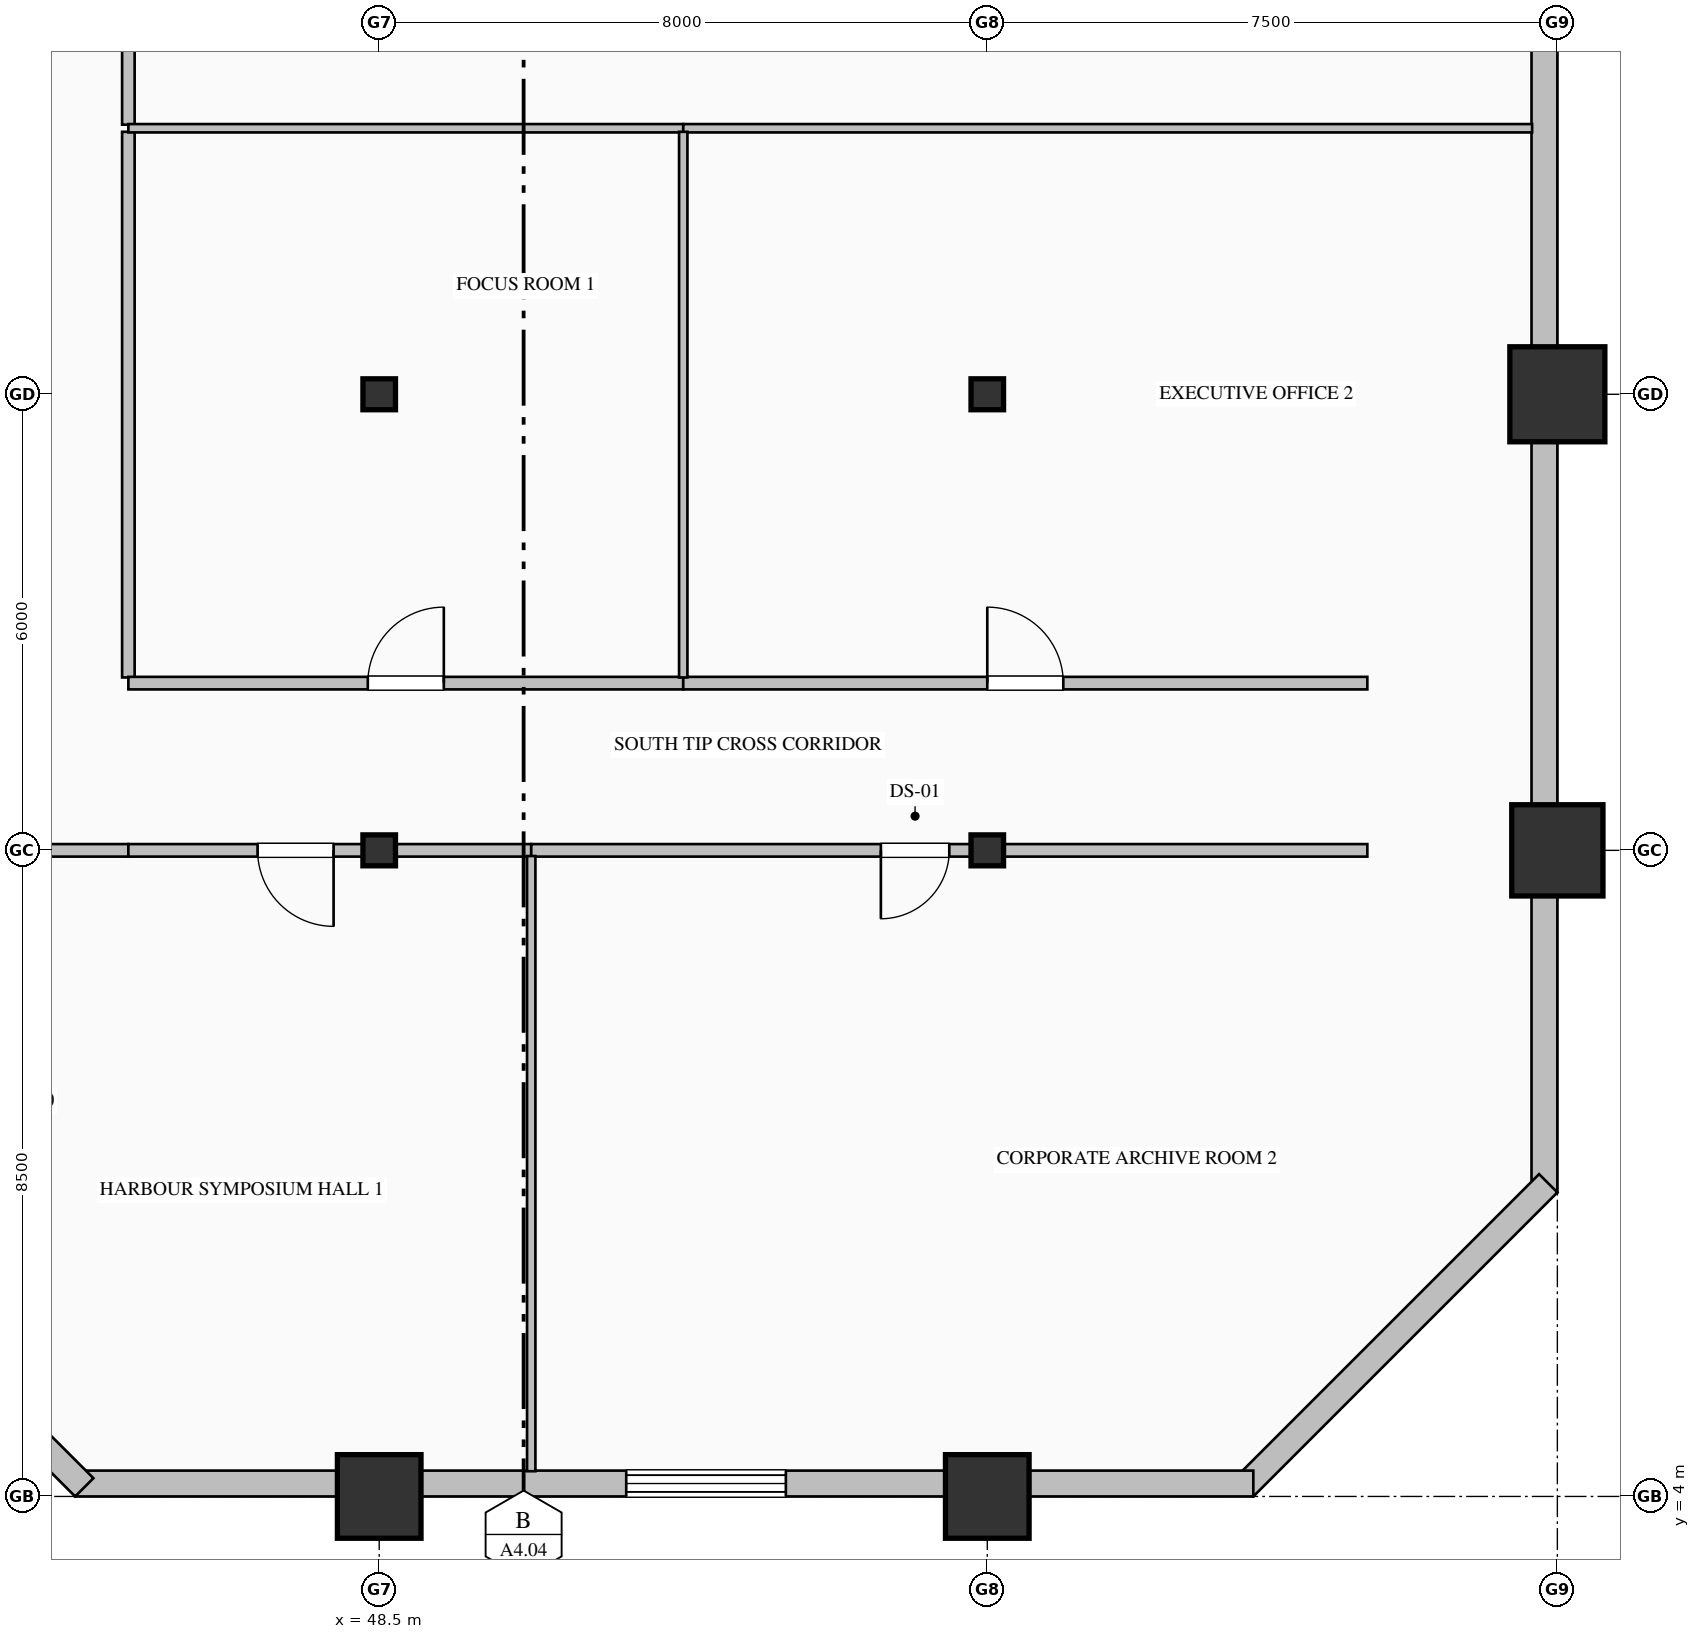
"""IFC4 building model, lengths in metres.
Left out: names, types, materials, properties, quantities, classifications, styles, units other than length and angle.
Written with IfcOpenShell. Run it as: python <this file> out.ifc"""

import sys

from ifc_helpers import new_model, si_unit, direction, frame, frame_2d, origin, origin_2d, place, context, subcontext, project, spatial, rectangle, hollow_rectangle, hollow_circle, i_section, extrude, element, fill, save


model = new_model("IFC4")
c1 = context("Model", 3, precision=1e-05, world=origin(), true_north=direction((0.0, 1.0)))
c2 = subcontext(c1, "Body", "Model", "MODEL_VIEW")
j1 = project(units=[si_unit("LENGTHUNIT", "METRE"), si_unit("PLANEANGLEUNIT", "RADIAN")], contexts=[c1])
p1 = place(None, origin())
s1 = spatial("IfcSite", under=j1, at=p1, CompositionType="ELEMENT")
p2 = place(p1, origin())
s2 = spatial("IfcBuilding", under=s1, at=p2, CompositionType="ELEMENT")
p3 = place(p2, frame((0.0, 0.0, 56.2)))
s3 = spatial("IfcBuildingStorey", under=s2, at=p3, CompositionType="ELEMENT", Elevation=56.2)
p4 = place(p3, frame((48.5, 4.0, 0.0), z_axis=(0.0, 0.0, 1.0), x_axis=(1.0, 0.0, 0.0)))
e1 = element("IfcColumn", 1, at=p4, inside=s3, PredefinedType="COLUMN", context=c2, shape_type="SweptSolid", body=[
    extrude(hollow_rectangle(XDim=1.1, YDim=1.1, WallThickness=0.04, at=origin_2d()), origin(), (0.0, 0.0, 1.0), 4.0),
])
for number, where, z_axis, x_axis in (
    (2, (48.5, 12.5, 0.0), (0.0, 0.0, 1.0), (1.0, 0.0, 0.0)),
    (3, (48.5, 18.5, 0.0), (0.0, 0.0, 1.0), (1.0, 0.0, 0.0)),
):
    element("IfcColumn", number, at=place(p3, frame(where, z_axis=z_axis, x_axis=x_axis)), inside=s3, PredefinedType="COLUMN", context=c2, shape_type="SweptSolid", body=[
        extrude(i_section(OverallWidth=0.407, OverallDepth=0.428, WebThickness=0.02, FlangeThickness=0.035, FilletRadius=0.022, at=origin_2d()), origin(), (0.0, 0.0, 1.0), 4.0),
    ])
p5 = place(p3, frame((56.5, 4.0, 0.0), z_axis=(0.0, 0.0, 1.0), x_axis=(1.0, 0.0, 0.0)))
e4 = element("IfcColumn", 4, at=p5, inside=s3, PredefinedType="COLUMN", context=c2, shape_type="SweptSolid", body=[
    extrude(hollow_rectangle(XDim=1.1, YDim=1.1, WallThickness=0.04, at=origin_2d()), origin(), (0.0, 0.0, 1.0), 4.0),
])
for number, where, z_axis, x_axis in (
    (5, (56.5, 12.5, 0.0), (0.0, 0.0, 1.0), (1.0, 0.0, 0.0)),
    (6, (56.5, 18.5, 0.0), (0.0, 0.0, 1.0), (1.0, 0.0, 0.0)),
):
    element("IfcColumn", number, at=place(p3, frame(where, z_axis=z_axis, x_axis=x_axis)), inside=s3, PredefinedType="COLUMN", context=c2, shape_type="SweptSolid", body=[
        extrude(i_section(OverallWidth=0.407, OverallDepth=0.428, WebThickness=0.02, FlangeThickness=0.035, FilletRadius=0.022, at=origin_2d()), origin(), (0.0, 0.0, 1.0), 4.0),
    ])
p6 = place(p3, frame((64.0, 12.5, 0.0), z_axis=(0.0, 0.0, 1.0), x_axis=(1.0, 0.0, 0.0)))
e7 = element("IfcColumn", 7, at=p6, inside=s3, PredefinedType="COLUMN", context=c2, shape_type="SweptSolid", body=[
    extrude(hollow_circle(Radius=0.6, WallThickness=0.04, at=origin_2d()), origin(), (0.0, 0.0, 1.0), 4.0),
])
p7 = place(p3, frame((64.0, 18.5, 0.0), z_axis=(0.0, 0.0, 1.0), x_axis=(1.0, 0.0, 0.0)))
e8 = element("IfcColumn", 8, at=p7, inside=s3, PredefinedType="COLUMN", context=c2, shape_type="SweptSolid", body=[
    extrude(hollow_rectangle(XDim=1.25, YDim=1.25, WallThickness=0.045, at=origin_2d()), origin(), (0.0, 0.0, 1.0), 4.0),
])
p8 = place(p3, frame((63.83, 36.05, 0.0), z_axis=(0.0, 0.0, 1.0), x_axis=(0.0, -1.0, 0.0)))
e9 = element("IfcWall", 9, at=p8, inside=s3, PredefinedType="SOLIDWALL", context=c2, shape_type="SweptSolid", body=[
    extrude(rectangle(XDim=28.05, YDim=0.34, at=frame_2d((14.025, 0.0))), origin(), (0.0, 0.0, 1.0), 3.25),
])
p9 = place(p8, frame((2.55, 0.0, 0.85)))
e10 = element("IfcOpeningElement", 10, at=p9, cuts=e9, PredefinedType="OPENING", context=c2, shape_type="SweptSolid", body=[
    extrude(rectangle(XDim=2.1, YDim=2.05, at=frame_2d((1.05, 1.025))), frame((0.0, 0.18, 0.0), z_axis=(0.0, -1.0, 0.0), x_axis=(1.0, 0.0, 0.0)), (0.0, 0.0, 1.0), 0.36),
])
p10 = place(p8, frame((9.9, 0.0, 0.85)))
e11 = element("IfcOpeningElement", 11, at=p10, cuts=e9, PredefinedType="OPENING", context=c2, shape_type="SweptSolid", body=[
    extrude(rectangle(XDim=1.8, YDim=2.05, at=frame_2d((0.9, 1.025))), frame((0.0, 0.18, 0.0), z_axis=(0.0, -1.0, 0.0), x_axis=(1.0, 0.0, 0.0)), (0.0, 0.0, 1.0), 0.36),
])
p11 = place(p3, frame((63.88, 8.12, 0.0), z_axis=(0.0, 0.0, 1.0), x_axis=(-0.707106781187, -0.707106781187, 0.0)))
e12 = element("IfcWall", 12, at=p11, inside=s3, PredefinedType="SOLIDWALL", context=c2, shape_type="SweptSolid", body=[
    extrude(rectangle(XDim=5.657, YDim=0.34, at=frame_2d((2.828, 0.0))), origin(), (0.0, 0.0, 1.0), 3.75),
])
p12 = place(p3, frame((60.0, 4.17, 0.0), z_axis=(0.0, 0.0, 1.0), x_axis=(-1.0, 0.0, 0.0)))
e13 = element("IfcWall", 13, at=p12, inside=s3, PredefinedType="SOLIDWALL", context=c2, shape_type="SweptSolid", body=[
    extrude(rectangle(XDim=15.5, YDim=0.34, at=frame_2d((7.75, 0.0))), origin(), (0.0, 0.0, 1.0), 3.25),
])
p13 = place(p12, frame((6.15, 0.0, 0.85)))
e14 = element("IfcOpeningElement", 14, at=p13, cuts=e13, PredefinedType="OPENING", context=c2, shape_type="SweptSolid", body=[
    extrude(rectangle(XDim=2.1, YDim=2.05, at=frame_2d((1.05, 1.025))), frame((0.0, 0.18, 0.0), z_axis=(0.0, -1.0, 0.0), x_axis=(1.0, 0.0, 0.0)), (0.0, 0.0, 1.0), 0.36),
])
p14 = place(p3, frame((44.62, 4.12, 0.0), z_axis=(0.0, 0.0, 1.0), x_axis=(-0.707106781187, 0.707106781187, 0.0)))
e15 = element("IfcWall", 15, at=p14, inside=s3, PredefinedType="SOLIDWALL", context=c2, shape_type="SweptSolid", body=[
    extrude(rectangle(XDim=5.657, YDim=0.34, at=frame_2d((2.828, 0.0))), origin(), (0.0, 0.0, 1.0), 3.75),
])
p15 = place(p3, frame((45.2, 31.525, 0.0), z_axis=(0.0, 0.0, 1.0), x_axis=(0.0, -1.0, 0.0)))
e16 = element("IfcWall", 16, at=p15, inside=s3, PredefinedType="PARTITIONING", context=c2, shape_type="SweptSolid", body=[
    extrude(rectangle(XDim=9.478, YDim=0.165, at=frame_2d((4.739, 0.0))), origin(), (0.0, 0.0, 1.0), 3.75),
])
p16 = place(p3, frame((45.2, 21.953, 0.0), z_axis=(0.0, 0.0, 1.0), x_axis=(0.0, -1.0, 0.0)))
e17 = element("IfcWall", 17, at=p16, inside=s3, PredefinedType="PARTITIONING", context=c2, shape_type="SweptSolid", body=[
    extrude(rectangle(XDim=7.178, YDim=0.165, at=frame_2d((3.589, 0.0))), origin(), (0.0, 0.0, 1.0), 3.75),
])
p17 = place(p3, frame((45.2, 12.5, 0.0), z_axis=(0.0, 0.0, 1.0), x_axis=(-1.0, 0.0, 0.0)))
e18 = element("IfcWall", 18, at=p17, inside=s3, PredefinedType="PARTITIONING", context=c2, shape_type="SweptSolid", body=[
    extrude(rectangle(XDim=2.2, YDim=0.165, at=frame_2d((1.1, 0.0))), origin(), (0.0, 0.0, 1.0), 3.042),
])
p18 = place(p3, frame((45.2, 14.7, 0.0), z_axis=(0.0, 0.0, 1.0), x_axis=(1.0, 0.0, 0.0)))
e19 = element("IfcWall", 19, at=p18, inside=s3, PredefinedType="PARTITIONING", context=c2, shape_type="SweptSolid", body=[
    extrude(rectangle(XDim=7.3, YDim=0.165, at=frame_2d((3.65, 0.0))), origin(), (0.0, 0.0, 1.0), 3.75),
])
p19 = place(p18, frame((3.15, 0.0, 0.0)))
e20 = element("IfcOpeningElement", 20, at=p19, cuts=e19, PredefinedType="OPENING", context=c2, shape_type="SweptSolid", body=[
    extrude(rectangle(XDim=1.0, YDim=2.15, at=frame_2d((0.5, 1.075))), frame((0.0, 0.093, 0.0), z_axis=(0.0, -1.0, 0.0), x_axis=(1.0, 0.0, 0.0)), (0.0, 0.0, 1.0), 0.185),
])
p20 = place(p3, frame((52.5, 14.7, 0.0), z_axis=(0.0, 0.0, 1.0), x_axis=(1.0, 0.0, 0.0)))
e21 = element("IfcWall", 21, at=p20, inside=s3, PredefinedType="PARTITIONING", context=c2, shape_type="SweptSolid", body=[
    extrude(rectangle(XDim=9.0, YDim=0.165, at=frame_2d((4.5, 0.0))), origin(), (0.0, 0.0, 1.0), 3.75),
])
p21 = place(p20, frame((4.0, 0.0, 0.0)))
e22 = element("IfcOpeningElement", 22, at=p21, cuts=e21, PredefinedType="OPENING", context=c2, shape_type="SweptSolid", body=[
    extrude(rectangle(XDim=1.0, YDim=2.15, at=frame_2d((0.5, 1.075))), frame((0.0, 0.093, 0.0), z_axis=(0.0, -1.0, 0.0), x_axis=(1.0, 0.0, 0.0)), (0.0, 0.0, 1.0), 0.185),
])
p22 = place(p3, frame((50.5, 12.5, 0.0), z_axis=(0.0, 0.0, 1.0), x_axis=(-1.0, 0.0, 0.0)))
e23 = element("IfcWall", 23, at=p22, inside=s3, PredefinedType="PARTITIONING", context=c2, shape_type="SweptSolid", body=[
    extrude(rectangle(XDim=5.3, YDim=0.165, at=frame_2d((2.65, 0.0))), origin(), (0.0, 0.0, 1.0), 3.042),
])
p23 = place(p22, frame((2.6, 0.0, 0.0)))
e24 = element("IfcOpeningElement", 24, at=p23, cuts=e23, PredefinedType="OPENING", context=c2, shape_type="SweptSolid", body=[
    extrude(rectangle(XDim=1.0, YDim=2.15, at=frame_2d((0.5, 1.075))), frame((0.0, 0.093, 0.0), z_axis=(0.0, -1.0, 0.0), x_axis=(1.0, 0.0, 0.0)), (0.0, 0.0, 1.0), 0.185),
])
p24 = place(p3, frame((61.5, 12.5, 0.0), z_axis=(0.0, 0.0, 1.0), x_axis=(-1.0, 0.0, 0.0)))
e25 = element("IfcWall", 25, at=p24, inside=s3, PredefinedType="PARTITIONING", context=c2, shape_type="SweptSolid", body=[
    extrude(rectangle(XDim=11.0, YDim=0.165, at=frame_2d((5.5, 0.0))), origin(), (0.0, 0.0, 1.0), 3.042),
])
p25 = place(p24, frame((5.5, 0.0, 0.0)))
e26 = element("IfcOpeningElement", 26, at=p25, cuts=e25, PredefinedType="OPENING", context=c2, shape_type="SweptSolid", body=[
    extrude(rectangle(XDim=0.9, YDim=2.15, at=frame_2d((0.45, 1.075))), frame((0.0, 0.093, 0.0), z_axis=(0.0, -1.0, 0.0), x_axis=(1.0, 0.0, 0.0)), (0.0, 0.0, 1.0), 0.185),
])
p26 = place(p3, frame((52.5, 22.0, 0.0), z_axis=(0.0, 0.0, 1.0), x_axis=(-1.0, 0.0, 0.0)))
e27 = element("IfcWall", 27, at=p26, inside=s3, PredefinedType="MOVABLE", context=c2, shape_type="SweptSolid", body=[
    extrude(rectangle(XDim=7.3, YDim=0.11, at=frame_2d((3.65, 0.0))), origin(), (0.0, 0.0, 1.0), 3.75),
])
p27 = place(p3, frame((63.668, 22.0, 0.0), z_axis=(0.0, 0.0, 1.0), x_axis=(-1.0, 0.0, 0.0)))
e28 = element("IfcWall", 28, at=p27, inside=s3, PredefinedType="MOVABLE", context=c2, shape_type="SweptSolid", body=[
    extrude(rectangle(XDim=11.168, YDim=0.11, at=frame_2d((5.584, 0.0))), origin(), (0.0, 0.0, 1.0), 3.75),
])
p28 = place(p3, frame((52.5, 21.953, 0.0), z_axis=(0.0, 0.0, 1.0), x_axis=(0.0, -1.0, 0.0)))
e29 = element("IfcWall", 29, at=p28, inside=s3, PredefinedType="MOVABLE", context=c2, shape_type="SweptSolid", body=[
    extrude(rectangle(XDim=7.178, YDim=0.11, at=frame_2d((3.589, 0.0))), origin(), (0.0, 0.0, 1.0), 3.75),
])
p29 = place(p3, frame((50.5, 12.426, 0.0), z_axis=(0.0, 0.0, 1.0), x_axis=(0.0, -1.0, 0.0)))
e30 = element("IfcWall", 30, at=p29, inside=s3, PredefinedType="MOVABLE", context=c2, shape_type="SweptSolid", body=[
    extrude(rectangle(XDim=8.094, YDim=0.11, at=frame_2d((4.047, 0.0))), origin(), (0.0, 0.0, 1.0), 3.75),
])
p30 = place(p13, origin())
e31 = element("IfcWindow", 31, at=p30, inside=s3, PartitioningType="TRIPLE_PANEL_VERTICAL", PredefinedType="WINDOW", context=c2, shape_type="SweptSolid", body=[
    extrude(rectangle(XDim=2.1, YDim=2.05, at=frame_2d((1.05, 1.025))), frame((0.0, 0.15, 0.0), z_axis=(0.0, -1.0, 0.0), x_axis=(1.0, 0.0, 0.0)), (0.0, 0.0, 1.0), 0.06),
])
fill(e14, e31)
p31 = place(p19, origin())
e32 = element("IfcDoor", 32, at=p31, inside=s3, OperationType="SINGLE_SWING_RIGHT", PredefinedType="DOOR", context=c2, shape_type="SweptSolid", body=[
    extrude(rectangle(XDim=1.0, YDim=2.15, at=frame_2d((0.5, 1.075))), frame((0.0, 0.025, 0.0), z_axis=(0.0, -1.0, 0.0), x_axis=(1.0, 0.0, 0.0)), (0.0, 0.0, 1.0), 0.05),
])
fill(e20, e32)
p32 = place(p21, origin())
e33 = element("IfcDoor", 33, at=p32, inside=s3, OperationType="SINGLE_SWING_LEFT", PredefinedType="DOOR", context=c2, shape_type="SweptSolid", body=[
    extrude(rectangle(XDim=1.0, YDim=2.15, at=frame_2d((0.5, 1.075))), frame((0.0, 0.025, 0.0), z_axis=(0.0, -1.0, 0.0), x_axis=(1.0, 0.0, 0.0)), (0.0, 0.0, 1.0), 0.05),
])
fill(e22, e33)
p33 = place(p23, origin())
e34 = element("IfcDoor", 34, at=p33, inside=s3, OperationType="SINGLE_SWING_LEFT", PredefinedType="DOOR", context=c2, shape_type="SweptSolid", body=[
    extrude(rectangle(XDim=1.0, YDim=2.15, at=frame_2d((0.5, 1.075))), frame((0.0, 0.025, 0.0), z_axis=(0.0, -1.0, 0.0), x_axis=(1.0, 0.0, 0.0)), (0.0, 0.0, 1.0), 0.05),
])
fill(e24, e34)
p34 = place(p25, origin())
e35 = element("IfcDoor", 35, at=p34, inside=s3, OperationType="SINGLE_SWING_RIGHT", PredefinedType="DOOR", context=c2, shape_type="SweptSolid", body=[
    extrude(rectangle(XDim=0.9, YDim=2.15, at=frame_2d((0.45, 1.075))), frame((0.0, 0.025, 0.0), z_axis=(0.0, -1.0, 0.0), x_axis=(1.0, 0.0, 0.0)), (0.0, 0.0, 1.0), 0.05),
])
fill(e26, e35)
save(model, sys.argv[1])
